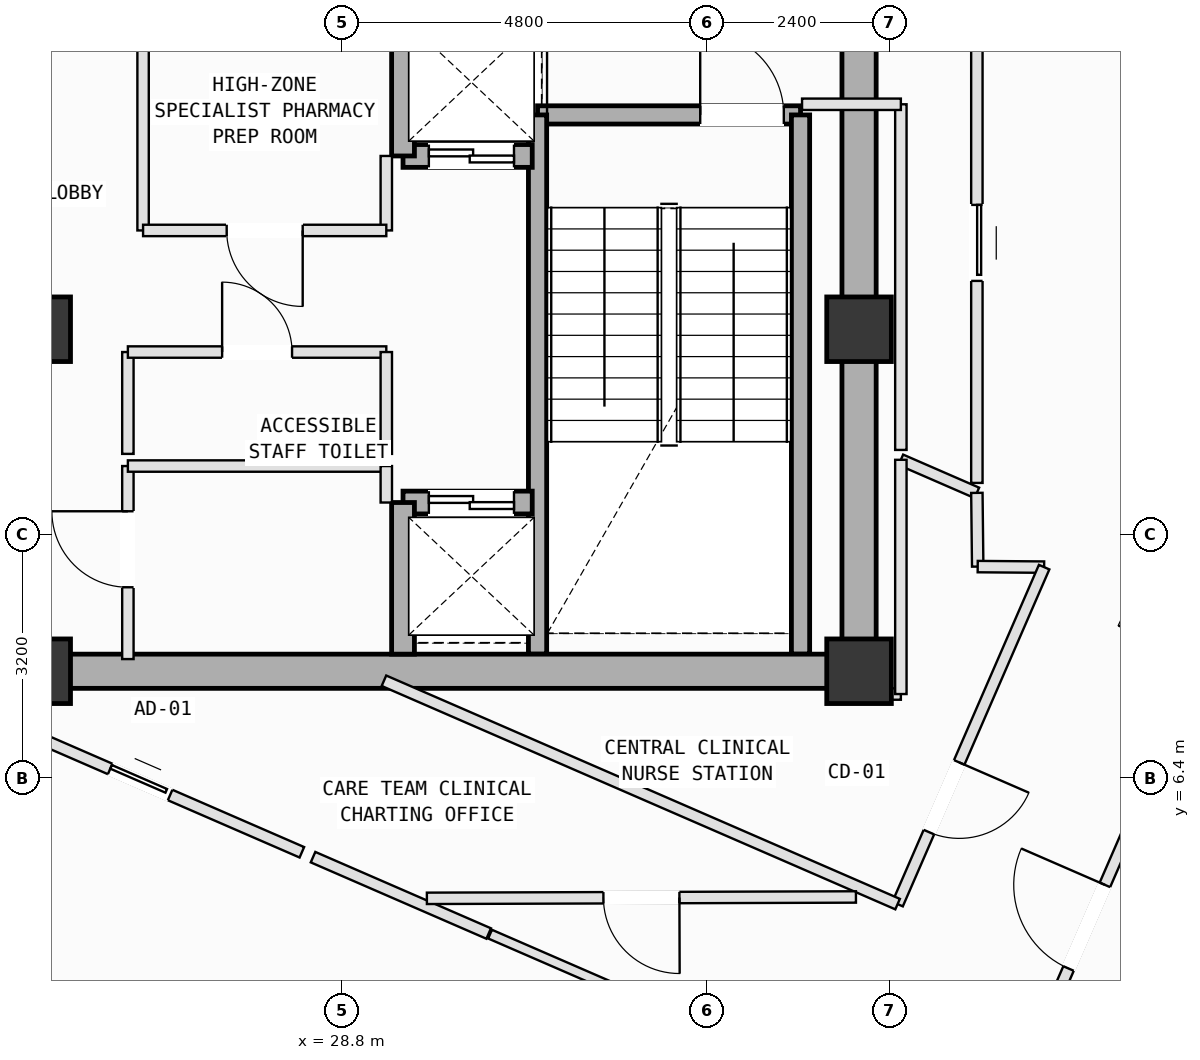
"""IFC4 building model, lengths in metres.
Left out: names, types, materials, properties, quantities, classifications, styles, units other than length and angle.
Written with IfcOpenShell. Run it as: python <this file> out.ifc"""

import sys

from ifc_helpers import new_model, si_unit, direction, frame, frame_2d, origin, origin_2d, place, context, subcontext, project, spatial, rectangle, extrude, element, fill, save


model = new_model("IFC4")
c1 = context("Model", 3, precision=1e-05, world=origin(), true_north=direction((0.0, 1.0)))
c2 = subcontext(c1, "Body", "Model", "MODEL_VIEW")
j1 = project(units=[si_unit("LENGTHUNIT", "METRE"), si_unit("PLANEANGLEUNIT", "RADIAN")], contexts=[c1])
p1 = place(None, origin())
s1 = spatial("IfcSite", under=j1, at=p1, CompositionType="ELEMENT")
p2 = place(p1, origin())
s2 = spatial("IfcBuilding", under=s1, at=p2, CompositionType="ELEMENT")
p3 = place(p2, frame((0.0, 0.0, 320.6)))
s3 = spatial("IfcBuildingStorey", under=s2, at=p3, CompositionType="ELEMENT", Elevation=320.6)
for number, where, z_axis, x_axis in (
    (1, (24.8, 7.8, 0.0), (0.0, 0.0, 1.0), (1.0, 0.0, 0.0)),
    (2, (24.8, 12.3, 0.0), (0.0, 0.0, 1.0), (1.0, 0.0, 0.0)),
    (3, (35.6, 7.8, 0.0), (0.0, 0.0, 1.0), (1.0, 0.0, 0.0)),
    (4, (35.6, 12.3, 0.0), (0.0, 0.0, 1.0), (1.0, 0.0, 0.0)),
):
    element("IfcColumn", number, at=place(p3, frame(where, z_axis=z_axis, x_axis=x_axis)), inside=s3, PredefinedType="COLUMN", context=c2, shape_type="SweptSolid", body=[
        extrude(rectangle(XDim=0.85, YDim=0.85, at=origin_2d()), origin(), (0.0, 0.0, 1.0), 4.0),
    ])
p4 = place(p3, frame((31.37, 15.12, 0.0), z_axis=(0.0, 0.0, 1.0), x_axis=(1.0, 0.0, 0.0)))
e5 = element("IfcWall", 5, at=p4, inside=s3, PredefinedType="SOLIDWALL", context=c2, shape_type="SweptSolid", body=[
    extrude(rectangle(XDim=3.46, YDim=0.24, at=frame_2d((1.73, 0.0))), origin(), (0.0, 0.0, 1.0), 3.78),
])
p5 = place(p4, frame((2.14, 0.0, 0.0)))
e6 = element("IfcOpeningElement", 6, at=p5, cuts=e5, PredefinedType="OPENING", context=c2, shape_type="SweptSolid", body=[
    extrude(rectangle(XDim=1.1, YDim=2.15, at=frame_2d((0.55, 1.075))), frame((0.0, 0.13, 0.0), z_axis=(0.0, -1.0, 0.0), x_axis=(1.0, 0.0, 0.0)), (0.0, 0.0, 1.0), 0.26),
])
for number, where, z_axis, x_axis in (
    (7, (34.83, 15.12, 0.0), (0.0, 0.0, 1.0), (0.0, -1.0, 0.0)),
    (8, (31.37, 8.025, 0.0), (0.0, 0.0, 1.0), (0.0, 1.0, 0.0)),
):
    element("IfcWall", number, at=place(p3, frame(where, z_axis=z_axis, x_axis=x_axis)), inside=s3, PredefinedType="SOLIDWALL", context=c2, shape_type="SweptSolid", body=[
        extrude(rectangle(XDim=7.095, YDim=0.24, at=frame_2d((3.548, 0.0))), origin(), (0.0, 0.0, 1.0), 3.78),
    ])
p6 = place(p3, frame((24.8, 7.8, 0.0), z_axis=(0.0, 0.0, 1.0), x_axis=(1.0, 0.0, 0.0)))
e9 = element("IfcWall", 9, at=p6, inside=s3, PredefinedType="SHEAR", context=c2, shape_type="SweptSolid", body=[
    extrude(rectangle(XDim=10.8, YDim=0.45, at=frame_2d((5.4, 0.0))), origin(), (0.0, 0.0, 1.0), 3.78),
])
p7 = place(p3, frame((35.6, 7.8, 0.0), z_axis=(0.0, 0.0, 1.0), x_axis=(0.0, 1.0, 0.0)))
e10 = element("IfcWall", 10, at=p7, inside=s3, PredefinedType="SHEAR", context=c2, shape_type="SweptSolid", body=[
    extrude(rectangle(XDim=9.0, YDim=0.45, at=frame_2d((4.5, 0.0))), origin(), (0.0, 0.0, 1.0), 3.78),
])
p8 = place(p3, frame((29.6, 10.02, 0.0), z_axis=(0.0, 0.0, 1.0), x_axis=(1.0, 0.0, 0.0)))
e11 = element("IfcWall", 11, at=p8, inside=s3, PredefinedType="SOLIDWALL", context=c2, shape_type="SweptSolid", body=[
    extrude(rectangle(XDim=1.7, YDim=0.3, at=frame_2d((0.85, 0.0))), origin(), (0.0, 0.0, 1.0), 3.78),
])
p9 = place(p8, frame((0.34, 0.0, 0.0)))
e12 = element("IfcOpeningElement", 12, at=p9, cuts=e11, PredefinedType="OPENING", context=c2, shape_type="SweptSolid", body=[
    extrude(rectangle(XDim=1.12, YDim=2.15, at=frame_2d((0.56, 1.075))), frame((0.0, 0.16, 0.0), z_axis=(0.0, -1.0, 0.0), x_axis=(1.0, 0.0, 0.0)), (0.0, 0.0, 1.0), 0.32),
])
p10 = place(p3, frame((29.6, 8.025, 0.0), z_axis=(0.0, 0.0, 1.0), x_axis=(0.0, 1.0, 0.0)))
e13 = element("IfcWall", 13, at=p10, inside=s3, PredefinedType="SOLIDWALL", context=c2, shape_type="SweptSolid", body=[
    extrude(rectangle(XDim=1.995, YDim=0.3, at=frame_2d((0.998, 0.0))), origin(), (0.0, 0.0, 1.0), 3.78),
])
p11 = place(p3, frame((29.6, 14.58, 0.0), z_axis=(0.0, 0.0, 1.0), x_axis=(1.0, 0.0, 0.0)))
e14 = element("IfcWall", 14, at=p11, inside=s3, PredefinedType="SOLIDWALL", context=c2, shape_type="SweptSolid", body=[
    extrude(rectangle(XDim=1.7, YDim=0.3, at=frame_2d((0.85, 0.0))), origin(), (0.0, 0.0, 1.0), 3.78),
])
p12 = place(p11, frame((0.34, 0.0, 0.0)))
e15 = element("IfcOpeningElement", 15, at=p12, cuts=e14, PredefinedType="OPENING", context=c2, shape_type="SweptSolid", body=[
    extrude(rectangle(XDim=1.12, YDim=2.15, at=frame_2d((0.56, 1.075))), frame((0.0, 0.16, 0.0), z_axis=(0.0, -1.0, 0.0), x_axis=(1.0, 0.0, 0.0)), (0.0, 0.0, 1.0), 0.32),
])
p13 = place(p3, frame((29.6, 14.58, 0.0), z_axis=(0.0, 0.0, 1.0), x_axis=(0.0, 1.0, 0.0)))
e16 = element("IfcWall", 16, at=p13, inside=s3, PredefinedType="SOLIDWALL", context=c2, shape_type="SweptSolid", body=[
    extrude(rectangle(XDim=2.22, YDim=0.3, at=frame_2d((1.11, 0.0))), origin(), (0.0, 0.0, 1.0), 3.78),
])
p14 = place(p3, frame((25.98, 7.96, 0.0), z_axis=(0.0, 0.0, 1.0), x_axis=(0.0, 1.0, 0.0)))
e17 = element("IfcWall", 17, at=p14, inside=s3, PredefinedType="PARTITIONING", context=c2, shape_type="SweptSolid", body=[
    extrude(rectangle(XDim=2.54, YDim=0.15, at=frame_2d((1.27, 0.0))), origin(), (0.0, 0.0, 1.0), 3.78),
])
p15 = place(p14, frame((0.945, 0.0, 0.0)))
e18 = element("IfcOpeningElement", 18, at=p15, cuts=e17, PredefinedType="OPENING", context=c2, shape_type="SweptSolid", body=[
    extrude(rectangle(XDim=1.0, YDim=2.12, at=frame_2d((0.5, 1.06))), frame((0.0, 0.085, 0.0), z_axis=(0.0, -1.0, 0.0), x_axis=(1.0, 0.0, 0.0)), (0.0, 0.0, 1.0), 0.17),
])
p16 = place(p3, frame((25.98, 10.5, 0.0), z_axis=(0.0, 0.0, 1.0), x_axis=(1.0, 0.0, 0.0)))
e19 = element("IfcWall", 19, at=p16, inside=s3, PredefinedType="PARTITIONING", context=c2, shape_type="SweptSolid", body=[
    extrude(rectangle(XDim=3.4, YDim=0.15, at=frame_2d((1.7, 0.0))), origin(), (0.0, 0.0, 1.0), 3.78),
])
p17 = place(p3, frame((29.38, 10.5, 0.0), z_axis=(0.0, 0.0, 1.0), x_axis=(0.0, -1.0, 0.0)))
e20 = element("IfcWall", 20, at=p17, inside=s3, PredefinedType="PARTITIONING", context=c2, shape_type="SweptSolid", body=[
    extrude(rectangle(XDim=0.48, YDim=0.15, at=frame_2d((0.24, 0.0))), origin(), (0.0, 0.0, 1.0), 3.78),
])
p18 = place(p3, frame((25.98, 10.66, 0.0), z_axis=(0.0, 0.0, 1.0), x_axis=(0.0, 1.0, 0.0)))
e21 = element("IfcWall", 21, at=p18, inside=s3, PredefinedType="PARTITIONING", context=c2, shape_type="SweptSolid", body=[
    extrude(rectangle(XDim=1.34, YDim=0.15, at=frame_2d((0.67, 0.0))), origin(), (0.0, 0.0, 1.0), 3.78),
])
p19 = place(p3, frame((25.98, 12.0, 0.0), z_axis=(0.0, 0.0, 1.0), x_axis=(1.0, 0.0, 0.0)))
e22 = element("IfcWall", 22, at=p19, inside=s3, PredefinedType="PARTITIONING", context=c2, shape_type="SweptSolid", body=[
    extrude(rectangle(XDim=3.4, YDim=0.15, at=frame_2d((1.7, 0.0))), origin(), (0.0, 0.0, 1.0), 3.78),
])
p20 = place(p19, frame((1.24, 0.0, 0.0)))
e23 = element("IfcOpeningElement", 23, at=p20, cuts=e22, PredefinedType="OPENING", context=c2, shape_type="SweptSolid", body=[
    extrude(rectangle(XDim=0.92, YDim=2.1, at=frame_2d((0.46, 1.05))), frame((0.0, 0.085, 0.0), z_axis=(0.0, -1.0, 0.0), x_axis=(1.0, 0.0, 0.0)), (0.0, 0.0, 1.0), 0.17),
])
p21 = place(p3, frame((29.38, 12.0, 0.0), z_axis=(0.0, 0.0, 1.0), x_axis=(0.0, -1.0, 0.0)))
e24 = element("IfcWall", 24, at=p21, inside=s3, PredefinedType="PARTITIONING", context=c2, shape_type="SweptSolid", body=[
    extrude(rectangle(XDim=1.34, YDim=0.15, at=frame_2d((0.67, 0.0))), origin(), (0.0, 0.0, 1.0), 3.78),
])
p22 = place(p3, frame((26.18, 13.6, 0.0), z_axis=(0.0, 0.0, 1.0), x_axis=(0.0, 1.0, 0.0)))
e25 = element("IfcWall", 25, at=p22, inside=s3, PredefinedType="PARTITIONING", context=c2, shape_type="SweptSolid", body=[
    extrude(rectangle(XDim=2.62, YDim=0.15, at=frame_2d((1.31, 0.0))), origin(), (0.0, 0.0, 1.0), 3.78),
])
p23 = place(p3, frame((29.38, 14.58, 0.0), z_axis=(0.0, 0.0, 1.0), x_axis=(0.0, -1.0, 0.0)))
e26 = element("IfcWall", 26, at=p23, inside=s3, PredefinedType="PARTITIONING", context=c2, shape_type="SweptSolid", body=[
    extrude(rectangle(XDim=0.98, YDim=0.15, at=frame_2d((0.49, 0.0))), origin(), (0.0, 0.0, 1.0), 3.78),
])
p24 = place(p3, frame((29.38, 13.6, 0.0), z_axis=(0.0, 0.0, 1.0), x_axis=(-1.0, 0.0, 0.0)))
e27 = element("IfcWall", 27, at=p24, inside=s3, PredefinedType="PARTITIONING", context=c2, shape_type="SweptSolid", body=[
    extrude(rectangle(XDim=3.2, YDim=0.15, at=frame_2d((1.6, 0.0))), origin(), (0.0, 0.0, 1.0), 3.78),
])
p25 = place(p24, frame((1.1, 0.0, 0.0)))
e28 = element("IfcOpeningElement", 28, at=p25, cuts=e27, PredefinedType="OPENING", context=c2, shape_type="SweptSolid", body=[
    extrude(rectangle(XDim=1.0, YDim=2.12, at=frame_2d((0.5, 1.06))), frame((0.0, 0.085, 0.0), z_axis=(0.0, -1.0, 0.0), x_axis=(1.0, 0.0, 0.0)), (0.0, 0.0, 1.0), 0.17),
])
p26 = place(p3, frame((37.75, 2.495, 0.0), z_axis=(0.0, 0.0, 1.0), x_axis=(0.398827178626, 0.917026107365, 0.0)))
e29 = element("IfcWall", 29, at=p26, inside=s3, PredefinedType="PARTITIONING", context=c2, shape_type="SweptSolid", body=[
    extrude(rectangle(XDim=4.24, YDim=0.15, at=frame_2d((2.12, 0.0))), origin(), (0.0, 0.0, 1.0), 3.78),
])
p27 = place(p26, frame((1.52, 0.0, 0.0)))
e30 = element("IfcOpeningElement", 30, at=p27, cuts=e29, PredefinedType="OPENING", context=c2, shape_type="SweptSolid", body=[
    extrude(rectangle(XDim=1.2, YDim=2.15, at=frame_2d((0.6, 1.075))), frame((0.0, 0.085, 0.0), z_axis=(0.0, -1.0, 0.0), x_axis=(1.0, 0.0, 0.0)), (0.0, 0.0, 1.0), 0.17),
])
p28 = place(p3, frame((28.416, 5.354, 0.0), z_axis=(0.0, 0.0, 1.0), x_axis=(0.917057734147, -0.398754451062, 0.0)))
e31 = element("IfcWall", 31, at=p28, inside=s3, PredefinedType="PARTITIONING", context=c2, shape_type="SweptSolid", body=[
    extrude(rectangle(XDim=2.52, YDim=0.15, at=frame_2d((1.26, 0.0))), origin(), (0.0, 0.0, 1.0), 3.78),
])
p29 = place(p3, frame((30.745, 4.341, 0.0), z_axis=(0.0, 0.0, 1.0), x_axis=(0.917094083809, -0.398670843481, 0.0)))
e32 = element("IfcWall", 32, at=p29, inside=s3, PredefinedType="PARTITIONING", context=c2, shape_type="SweptSolid", body=[
    extrude(rectangle(XDim=2.1, YDim=0.125, at=frame_2d((1.05, 0.0))), origin(), (0.0, 0.0, 1.0), 3.78),
])
p30 = place(p3, frame((24.014, 7.268, 0.0), z_axis=(0.0, 0.0, 1.0), x_axis=(0.91706671013, -0.398733807411, 0.0)))
e33 = element("IfcWall", 33, at=p30, inside=s3, PredefinedType="PARTITIONING", context=c2, shape_type="SweptSolid", body=[
    extrude(rectangle(XDim=4.64, YDim=0.15, at=frame_2d((2.32, 0.0))), origin(), (0.0, 0.0, 1.0), 3.78),
])
p31 = place(p30, frame((1.89, 0.0, 0.0)))
e34 = element("IfcOpeningElement", 34, at=p31, cuts=e33, PredefinedType="OPENING", context=c2, shape_type="SweptSolid", body=[
    extrude(rectangle(XDim=0.86, YDim=2.06, at=frame_2d((0.43, 1.03))), frame((0.0, 0.085, 0.0), z_axis=(0.0, -1.0, 0.0), x_axis=(1.0, 0.0, 0.0)), (0.0, 0.0, 1.0), 0.17),
])
p32 = place(p3, frame((36.15, 10.582, 0.0), z_axis=(0.0, 0.0, 1.0), x_axis=(0.916977493273, -0.398938938724, 0.0)))
e35 = element("IfcWall", 35, at=p32, inside=s3, PredefinedType="PARTITIONING", context=c2, shape_type="SweptSolid", body=[
    extrude(rectangle(XDim=1.091, YDim=0.15, at=frame_2d((0.545, 0.0))), origin(), (0.0, 0.0, 1.0), 3.78),
])
p33 = place(p3, frame((37.15, 10.147, 0.0), z_axis=(0.0, 0.0, 1.0), x_axis=(0.011325727104, -0.999935861896, 0.0)))
e36 = element("IfcWall", 36, at=p33, inside=s3, PredefinedType="PARTITIONING", context=c2, shape_type="SweptSolid", body=[
    extrude(rectangle(XDim=0.97, YDim=0.15, at=frame_2d((0.485, 0.0))), origin(), (0.0, 0.0, 1.0), 3.78),
])
p34 = place(p3, frame((37.161, 9.177, 0.0), z_axis=(0.0, 0.0, 1.0), x_axis=(0.999967192089, -0.008100292897, 0.0)))
e37 = element("IfcWall", 37, at=p34, inside=s3, PredefinedType="PARTITIONING", context=c2, shape_type="SweptSolid", body=[
    extrude(rectangle(XDim=0.874, YDim=0.15, at=frame_2d((0.437, 0.0))), origin(), (0.0, 0.0, 1.0), 3.78),
])
p35 = place(p3, frame((38.035, 9.17, 0.0), z_axis=(0.0, 0.0, 1.0), x_axis=(-0.398764886009, -0.917053196759, 0.0)))
e38 = element("IfcWall", 38, at=p35, inside=s3, PredefinedType="PARTITIONING", context=c2, shape_type="SweptSolid", body=[
    extrude(rectangle(XDim=4.835, YDim=0.15, at=frame_2d((2.417, 0.0))), origin(), (0.0, 0.0, 1.0), 3.78),
])
p36 = place(p35, frame((2.802, 0.0, 0.0)))
e39 = element("IfcOpeningElement", 39, at=p36, cuts=e38, PredefinedType="OPENING", context=c2, shape_type="SweptSolid", body=[
    extrude(rectangle(XDim=1.0, YDim=2.12, at=frame_2d((0.5, 1.06))), frame((0.0, 0.085, 0.0), z_axis=(0.0, -1.0, 0.0), x_axis=(1.0, 0.0, 0.0)), (0.0, 0.0, 1.0), 0.17),
])
p37 = place(p3, frame((36.107, 4.736, 0.0), z_axis=(0.0, 0.0, 1.0), x_axis=(-0.917031075712, 0.398815754676, 0.0)))
e40 = element("IfcWall", 40, at=p37, inside=s3, PredefinedType="PARTITIONING", context=c2, shape_type="SweptSolid", body=[
    extrude(rectangle(XDim=7.369, YDim=0.15, at=frame_2d((3.685, 0.0))), origin(), (0.0, 0.0, 1.0), 3.78),
])
p38 = place(p3, frame((35.6, 7.5, 0.0), z_axis=(0.0, 0.0, 1.0), x_axis=(1.0, 0.0, 0.0)))
e41 = element("IfcWall", 41, at=p38, inside=s3, PredefinedType="PARTITIONING", context=c2, shape_type="SweptSolid", body=[
    extrude(rectangle(XDim=0.55, YDim=0.15, at=frame_2d((0.275, 0.0))), origin(), (0.0, 0.0, 1.0), 2.765),
])
p39 = place(p3, frame((36.15, 7.5, 0.0), z_axis=(0.0, 0.0, 1.0), x_axis=(0.0, 1.0, 0.0)))
e42 = element("IfcWall", 42, at=p39, inside=s3, PredefinedType="PARTITIONING", context=c2, shape_type="SweptSolid", body=[
    extrude(rectangle(XDim=3.082, YDim=0.15, at=frame_2d((1.541, 0.0))), origin(), (0.0, 0.0, 1.0), 3.78),
])
p40 = place(p3, frame((37.15, 16.516, 0.0), z_axis=(0.0, 0.0, 1.0), x_axis=(0.0, -1.0, 0.0)))
e43 = element("IfcWall", 43, at=p40, inside=s3, PredefinedType="PARTITIONING", context=c2, shape_type="SweptSolid", body=[
    extrude(rectangle(XDim=6.238, YDim=0.15, at=frame_2d((3.119, 0.0))), origin(), (0.0, 0.0, 1.0), 3.78),
])
p41 = place(p40, frame((2.58, 0.0, 0.0)))
e44 = element("IfcOpeningElement", 44, at=p41, cuts=e43, PredefinedType="OPENING", context=c2, shape_type="SweptSolid", body=[
    extrude(rectangle(XDim=1.0, YDim=2.12, at=frame_2d((0.5, 1.06))), frame((0.0, 0.085, 0.0), z_axis=(0.0, -1.0, 0.0), x_axis=(1.0, 0.0, 0.0)), (0.0, 0.0, 1.0), 0.17),
])
p42 = place(p3, frame((36.15, 10.712, 0.0), z_axis=(0.0, 0.0, 1.0), x_axis=(0.0, 1.0, 0.0)))
e45 = element("IfcWall", 45, at=p42, inside=s3, PredefinedType="PARTITIONING", context=c2, shape_type="SweptSolid", body=[
    extrude(rectangle(XDim=4.548, YDim=0.15, at=frame_2d((2.274, 0.0))), origin(), (0.0, 0.0, 1.0), 3.78),
])
p43 = place(p3, frame((36.15, 15.26, 0.0), z_axis=(0.0, 0.0, 1.0), x_axis=(-1.0, 0.0, 0.0)))
e46 = element("IfcWall", 46, at=p43, inside=s3, PredefinedType="PARTITIONING", context=c2, shape_type="SweptSolid", body=[
    extrude(rectangle(XDim=1.3, YDim=0.15, at=frame_2d((0.65, 0.0))), origin(), (0.0, 0.0, 1.0), 3.78),
])
p44 = place(p3, frame((35.559, 4.83, 0.0), z_axis=(0.0, 0.0, 1.0), x_axis=(-0.999994878711, -0.003200398799, 0.0)))
e47 = element("IfcWall", 47, at=p44, inside=s3, PredefinedType="PARTITIONING", context=c2, shape_type="SweptSolid", body=[
    extrude(rectangle(XDim=5.645, YDim=0.15, at=frame_2d((2.823, 0.0))), origin(), (0.0, 0.0, 1.0), 3.78),
])
p45 = place(p44, frame((2.323, 0.0, 0.0)))
e48 = element("IfcOpeningElement", 48, at=p45, cuts=e47, PredefinedType="OPENING", context=c2, shape_type="SweptSolid", body=[
    extrude(rectangle(XDim=1.0, YDim=2.12, at=frame_2d((0.5, 1.06))), frame((0.0, 0.085, 0.0), z_axis=(0.0, -1.0, 0.0), x_axis=(1.0, 0.0, 0.0)), (0.0, 0.0, 1.0), 0.17),
])
p46 = place(p5, origin())
e49 = element("IfcDoor", 49, at=p46, inside=s3, OperationType="SINGLE_SWING_LEFT", PredefinedType="DOOR", context=c2, shape_type="SweptSolid", body=[
    extrude(rectangle(XDim=1.1, YDim=2.15, at=frame_2d((0.55, 1.075))), frame((0.0, 0.025, 0.0), z_axis=(0.0, -1.0, 0.0), x_axis=(1.0, 0.0, 0.0)), (0.0, 0.0, 1.0), 0.05),
])
fill(e6, e49)
p47 = place(p9, origin())
e50 = element("IfcDoor", 50, at=p47, inside=s3, OperationType="DOUBLE_DOOR_SLIDING", PredefinedType="DOOR", context=c2, shape_type="SweptSolid", body=[
    extrude(rectangle(XDim=1.12, YDim=2.15, at=frame_2d((0.56, 1.075))), frame((0.0, 0.025, 0.0), z_axis=(0.0, -1.0, 0.0), x_axis=(1.0, 0.0, 0.0)), (0.0, 0.0, 1.0), 0.05),
])
fill(e12, e50)
p48 = place(p12, origin())
e51 = element("IfcDoor", 51, at=p48, inside=s3, OperationType="DOUBLE_DOOR_SLIDING", PredefinedType="DOOR", context=c2, shape_type="SweptSolid", body=[
    extrude(rectangle(XDim=1.12, YDim=2.15, at=frame_2d((0.56, 1.075))), frame((0.0, 0.025, 0.0), z_axis=(0.0, -1.0, 0.0), x_axis=(1.0, 0.0, 0.0)), (0.0, 0.0, 1.0), 0.05),
])
fill(e15, e51)
p49 = place(p15, origin())
e52 = element("IfcDoor", 52, at=p49, inside=s3, OperationType="SINGLE_SWING_RIGHT", PredefinedType="DOOR", context=c2, shape_type="SweptSolid", body=[
    extrude(rectangle(XDim=1.0, YDim=2.12, at=frame_2d((0.5, 1.06))), frame((0.0, 0.025, 0.0), z_axis=(0.0, -1.0, 0.0), x_axis=(1.0, 0.0, 0.0)), (0.0, 0.0, 1.0), 0.05),
])
fill(e18, e52)
p50 = place(p20, origin())
e53 = element("IfcDoor", 53, at=p50, inside=s3, OperationType="SINGLE_SWING_LEFT", PredefinedType="DOOR", context=c2, shape_type="SweptSolid", body=[
    extrude(rectangle(XDim=0.92, YDim=2.1, at=frame_2d((0.46, 1.05))), frame((0.0, 0.025, 0.0), z_axis=(0.0, -1.0, 0.0), x_axis=(1.0, 0.0, 0.0)), (0.0, 0.0, 1.0), 0.05),
])
fill(e23, e53)
p51 = place(p25, origin())
e54 = element("IfcDoor", 54, at=p51, inside=s3, OperationType="SINGLE_SWING_LEFT", PredefinedType="DOOR", context=c2, shape_type="SweptSolid", body=[
    extrude(rectangle(XDim=1.0, YDim=2.12, at=frame_2d((0.5, 1.06))), frame((0.0, 0.025, 0.0), z_axis=(0.0, -1.0, 0.0), x_axis=(1.0, 0.0, 0.0)), (0.0, 0.0, 1.0), 0.05),
])
fill(e28, e54)
p52 = place(p27, origin())
e55 = element("IfcDoor", 55, at=p52, inside=s3, OperationType="SINGLE_SWING_RIGHT", PredefinedType="DOOR", context=c2, shape_type="SweptSolid", body=[
    extrude(rectangle(XDim=1.2, YDim=2.15, at=frame_2d((0.6, 1.075))), frame((0.0, 0.025, 0.0), z_axis=(0.0, -1.0, 0.0), x_axis=(1.0, 0.0, 0.0)), (0.0, 0.0, 1.0), 0.05),
])
fill(e30, e55)
p53 = place(p36, origin())
e56 = element("IfcDoor", 56, at=p53, inside=s3, OperationType="SINGLE_SWING_LEFT", PredefinedType="DOOR", context=c2, shape_type="SweptSolid", body=[
    extrude(rectangle(XDim=1.0, YDim=2.12, at=frame_2d((0.5, 1.06))), frame((0.0, 0.025, 0.0), z_axis=(0.0, -1.0, 0.0), x_axis=(1.0, 0.0, 0.0)), (0.0, 0.0, 1.0), 0.05),
])
fill(e39, e56)
p54 = place(p41, origin())
e57 = element("IfcDoor", 57, at=p54, inside=s3, OperationType="SLIDING_TO_LEFT", PredefinedType="DOOR", context=c2, shape_type="SweptSolid", body=[
    extrude(rectangle(XDim=1.0, YDim=2.12, at=frame_2d((0.5, 1.06))), frame((0.0, 0.025, 0.0), z_axis=(0.0, -1.0, 0.0), x_axis=(1.0, 0.0, 0.0)), (0.0, 0.0, 1.0), 0.05),
])
fill(e44, e57)
p55 = place(p45, origin())
e58 = element("IfcDoor", 58, at=p55, inside=s3, OperationType="SINGLE_SWING_LEFT", PredefinedType="DOOR", context=c2, shape_type="SweptSolid", body=[
    extrude(rectangle(XDim=1.0, YDim=2.12, at=frame_2d((0.5, 1.06))), frame((0.0, 0.025, 0.0), z_axis=(0.0, -1.0, 0.0), x_axis=(1.0, 0.0, 0.0)), (0.0, 0.0, 1.0), 0.05),
])
fill(e48, e58)
p56 = place(p31, origin())
e59 = element("IfcDoor", 59, at=p56, inside=s3, OperationType="SLIDING_TO_LEFT", PredefinedType="DOOR", context=c2, shape_type="SweptSolid", body=[
    extrude(rectangle(XDim=0.86, YDim=2.06, at=frame_2d((0.43, 1.03))), frame((0.0, 0.025, 0.0), z_axis=(0.0, -1.0, 0.0), x_axis=(1.0, 0.0, 0.0)), (0.0, 0.0, 1.0), 0.05),
])
fill(e34, e59)
save(model, sys.argv[1])
